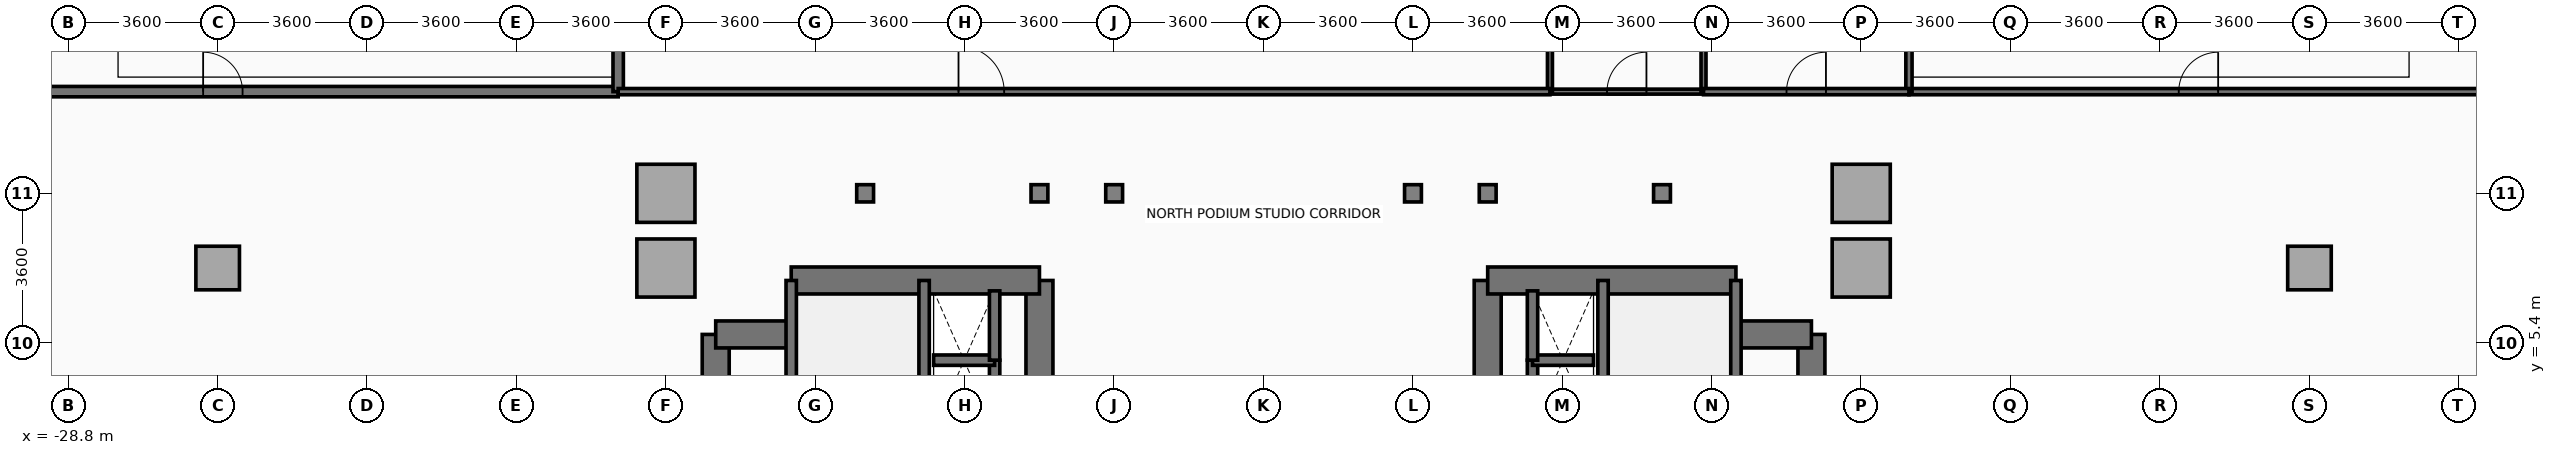
"""IFC4 building model, lengths in metres.
Left out: names, types, materials, properties, quantities, classifications, styles, units other than length and angle.
Written with IfcOpenShell. Run it as: python <this file> out.ifc"""

import sys

from ifc_helpers import new_model, si_unit, direction, frame, frame_2d, origin, origin_2d, place, context, subcontext, project, spatial, rectangle, i_section, extrude, source, transform, mapped, element, fill, save


model = new_model("IFC4")
c1 = context("Model", 3, precision=1e-05, world=origin(), true_north=direction((0.0, 1.0)))
c2 = subcontext(c1, "Body", "Model", "MODEL_VIEW")
j1 = project(units=[si_unit("LENGTHUNIT", "METRE"), si_unit("PLANEANGLEUNIT", "RADIAN")], contexts=[c1])
p1 = place(None, origin())
s1 = spatial("IfcSite", under=j1, at=p1, CompositionType="ELEMENT")
p2 = place(p1, origin())
s2 = spatial("IfcBuilding", under=s1, at=p2, CompositionType="ELEMENT")
p3 = place(p2, frame((0.0, 0.0, 10.2)))
s3 = spatial("IfcBuildingStorey", under=s2, at=p3, CompositionType="ELEMENT", Elevation=10.2)
m1 = source(origin(), c2, "Body", "SweptSolid", [
    extrude(rectangle(XDim=1.05, YDim=1.05, at=origin_2d()), origin(), (0.0, 0.0, 1.0), 5.15),
])
p4 = place(p3, frame((-25.2, 7.2, 0.0), z_axis=(0.0, 0.0, 1.0), x_axis=(1.0, 0.0, 0.0)))
e1 = element("IfcColumn", 1, at=p4, inside=s3, PredefinedType="COLUMN", context=c2, shape_type="MappedRepresentation", body=[
    mapped(m1, transform((0.0, 0.0, 0.0), x_axis=(1.0, 0.0, 0.0), y_axis=(0.0, 1.0, 0.0), z_axis=(0.0, 0.0, 1.0), scale=1.0)),
])
m2 = source(origin(), c2, "Body", "SweptSolid", [
    extrude(rectangle(XDim=1.4, YDim=1.4, at=origin_2d()), origin(), (0.0, 0.0, 1.0), 5.15),
])
for number, where, z_axis, x_axis in (
    (2, (-14.4, 7.2, 0.0), (0.0, 0.0, 1.0), (1.0, 0.0, 0.0)),
    (3, (-14.4, 9.0, 0.0), (0.0, 0.0, 1.0), (1.0, 0.0, 0.0)),
):
    element("IfcColumn", number, at=place(p3, frame(where, z_axis=z_axis, x_axis=x_axis)), inside=s3, PredefinedType="COLUMN", context=c2, shape_type="MappedRepresentation", body=[
        mapped(m2, transform((0.0, 0.0, 0.0), x_axis=(1.0, 0.0, 0.0), y_axis=(0.0, 1.0, 0.0), z_axis=(0.0, 0.0, 1.0), scale=1.0)),
    ])
m3 = source(origin(), c2, "Body", "SweptSolid", [
    extrude(i_section(OverallWidth=0.406, OverallDepth=0.416, WebThickness=0.024, FlangeThickness=0.039, at=origin_2d()), origin(), (0.0, 0.0, 1.0), 5.15),
])
for number, where, z_axis, x_axis in (
    (4, (-9.6, 9.0, 0.0), (0.0, 0.0, 1.0), (1.0, 0.0, 0.0)),
    (5, (-5.4, 9.0, 0.0), (0.0, 0.0, 1.0), (1.0, 0.0, 0.0)),
    (6, (-3.6, 9.0, 0.0), (0.0, 0.0, 1.0), (1.0, 0.0, 0.0)),
    (7, (3.6, 9.0, 0.0), (0.0, 0.0, 1.0), (1.0, 0.0, 0.0)),
    (8, (5.4, 9.0, 0.0), (0.0, 0.0, 1.0), (1.0, 0.0, 0.0)),
    (9, (9.6, 9.0, 0.0), (0.0, 0.0, 1.0), (1.0, 0.0, 0.0)),
):
    element("IfcColumn", number, at=place(p3, frame(where, z_axis=z_axis, x_axis=x_axis)), inside=s3, PredefinedType="COLUMN", context=c2, shape_type="MappedRepresentation", body=[
        mapped(m3, transform((0.0, 0.0, 0.0), x_axis=(1.0, 0.0, 0.0), y_axis=(0.0, 1.0, 0.0), z_axis=(0.0, 0.0, 1.0), scale=1.0)),
    ])
for number, where, z_axis, x_axis in (
    (10, (14.4, 7.2, 0.0), (0.0, 0.0, 1.0), (1.0, 0.0, 0.0)),
    (11, (14.4, 9.0, 0.0), (0.0, 0.0, 1.0), (1.0, 0.0, 0.0)),
):
    element("IfcColumn", number, at=place(p3, frame(where, z_axis=z_axis, x_axis=x_axis)), inside=s3, PredefinedType="COLUMN", context=c2, shape_type="MappedRepresentation", body=[
        mapped(m2, transform((0.0, 0.0, 0.0), x_axis=(1.0, 0.0, 0.0), y_axis=(0.0, 1.0, 0.0), z_axis=(0.0, 0.0, 1.0), scale=1.0)),
    ])
p5 = place(p3, frame((25.2, 7.2, 0.0), z_axis=(0.0, 0.0, 1.0), x_axis=(1.0, 0.0, 0.0)))
e12 = element("IfcColumn", 12, at=p5, inside=s3, PredefinedType="COLUMN", context=c2, shape_type="MappedRepresentation", body=[
    mapped(m1, transform((0.0, 0.0, 0.0), x_axis=(1.0, 0.0, 0.0), y_axis=(0.0, 1.0, 0.0), z_axis=(0.0, 0.0, 1.0), scale=1.0)),
])
p6 = place(p3, frame((-13.2, -5.6, 0.0), z_axis=(0.0, 0.0, 1.0), x_axis=(0.0, 1.0, 0.0)))
e13 = element("IfcWall", 13, at=p6, inside=s3, PredefinedType="SHEAR", context=c2, shape_type="SweptSolid", body=[
    extrude(rectangle(XDim=11.2, YDim=0.65, at=frame_2d((5.6, 0.0))), origin(), (0.0, 0.0, 1.0), 5.15),
])
p7 = place(p3, frame((-5.4, -5.6, 0.0), z_axis=(0.0, 0.0, 1.0), x_axis=(0.0, 1.0, 0.0)))
e14 = element("IfcWall", 14, at=p7, inside=s3, PredefinedType="SHEAR", context=c2, shape_type="SweptSolid", body=[
    extrude(rectangle(XDim=12.5, YDim=0.65, at=frame_2d((6.25, 0.0))), origin(), (0.0, 0.0, 1.0), 5.15),
])
p8 = place(p7, frame((4.55, 0.0, 0.0)))
e15 = element("IfcOpeningElement", 15, at=p8, cuts=e14, PredefinedType="OPENING", context=c2, shape_type="SweptSolid", body=[
    extrude(rectangle(XDim=1.2, YDim=2.2, at=frame_2d((0.6, 1.1))), frame((0.0, 0.335, 0.0), z_axis=(0.0, -1.0, 0.0), x_axis=(1.0, 0.0, 0.0)), (0.0, 0.0, 1.0), 0.67),
])
p9 = place(p7, frame((6.86, 0.0, 0.0)))
e16 = element("IfcOpeningElement", 16, at=p9, cuts=e14, PredefinedType="OPENING", context=c2, shape_type="SweptSolid", body=[
    extrude(rectangle(XDim=0.8, YDim=2.1, at=frame_2d((0.4, 1.05))), frame((0.0, 0.335, 0.0), z_axis=(0.0, -1.0, 0.0), x_axis=(1.0, 0.0, 0.0)), (0.0, 0.0, 1.0), 0.67),
])
p10 = place(p3, frame((-11.381, 6.9, 0.0), z_axis=(0.0, 0.0, 1.0), x_axis=(1.0, 0.0, 0.0)))
e17 = element("IfcWall", 17, at=p10, inside=s3, PredefinedType="SHEAR", context=c2, shape_type="SweptSolid", body=[
    extrude(rectangle(XDim=5.981, YDim=0.65, at=frame_2d((2.991, 0.0))), origin(), (0.0, 0.0, 1.0), 5.15),
])
p11 = place(p3, frame((-13.2, 5.6, 0.0), z_axis=(0.0, 0.0, 1.0), x_axis=(1.0, 0.0, 0.0)))
e18 = element("IfcWall", 18, at=p11, inside=s3, PredefinedType="SHEAR", context=c2, shape_type="SweptSolid", body=[
    extrude(rectangle(XDim=1.819, YDim=0.65, at=frame_2d((0.909, 0.0))), origin(), (0.0, 0.0, 1.0), 5.15),
])
p12 = place(p3, frame((-8.179, -0.041, 0.0), z_axis=(0.0, 0.0, 1.0), x_axis=(0.0, 1.0, 0.0)))
e19 = element("IfcWall", 19, at=p12, inside=s3, PredefinedType="SOLIDWALL", context=c2, shape_type="SweptSolid", body=[
    extrude(rectangle(XDim=6.941, YDim=0.25, at=frame_2d((3.47, 0.0))), origin(), (0.0, 0.0, 1.0), 5.15),
])
p13 = place(p12, frame((0.2, 0.0, 0.0)))
e20 = element("IfcOpeningElement", 20, at=p13, cuts=e19, PredefinedType="OPENING", context=c2, shape_type="SweptSolid", body=[
    extrude(rectangle(XDim=1.2, YDim=2.2, at=frame_2d((0.6, 1.1))), frame((0.0, 0.135, 0.0), z_axis=(0.0, -1.0, 0.0), x_axis=(1.0, 0.0, 0.0)), (0.0, 0.0, 1.0), 0.27),
])
p14 = place(p3, frame((-11.381, -0.041, 0.0), z_axis=(0.0, 0.0, 1.0), x_axis=(0.0, 1.0, 0.0)))
e21 = element("IfcWall", 21, at=p14, inside=s3, PredefinedType="SOLIDWALL", context=c2, shape_type="SweptSolid", body=[
    extrude(rectangle(XDim=6.941, YDim=0.25, at=frame_2d((3.47, 0.0))), origin(), (0.0, 0.0, 1.0), 5.15),
])
p15 = place(p3, frame((13.2, -5.6, 0.0), z_axis=(0.0, 0.0, 1.0), x_axis=(0.0, 1.0, 0.0)))
e22 = element("IfcWall", 22, at=p15, inside=s3, PredefinedType="SHEAR", context=c2, shape_type="SweptSolid", body=[
    extrude(rectangle(XDim=11.2, YDim=0.65, at=frame_2d((5.6, 0.0))), origin(), (0.0, 0.0, 1.0), 5.15),
])
p16 = place(p3, frame((5.4, -5.6, 0.0), z_axis=(0.0, 0.0, 1.0), x_axis=(0.0, 1.0, 0.0)))
e23 = element("IfcWall", 23, at=p16, inside=s3, PredefinedType="SHEAR", context=c2, shape_type="SweptSolid", body=[
    extrude(rectangle(XDim=12.5, YDim=0.65, at=frame_2d((6.25, 0.0))), origin(), (0.0, 0.0, 1.0), 5.15),
])
p17 = place(p16, frame((4.55, 0.0, 0.0)))
e24 = element("IfcOpeningElement", 24, at=p17, cuts=e23, PredefinedType="OPENING", context=c2, shape_type="SweptSolid", body=[
    extrude(rectangle(XDim=1.2, YDim=2.2, at=frame_2d((0.6, 1.1))), frame((0.0, 0.335, 0.0), z_axis=(0.0, -1.0, 0.0), x_axis=(1.0, 0.0, 0.0)), (0.0, 0.0, 1.0), 0.67),
])
p18 = place(p16, frame((6.86, 0.0, 0.0)))
e25 = element("IfcOpeningElement", 25, at=p18, cuts=e23, PredefinedType="OPENING", context=c2, shape_type="SweptSolid", body=[
    extrude(rectangle(XDim=0.8, YDim=2.1, at=frame_2d((0.4, 1.05))), frame((0.0, 0.335, 0.0), z_axis=(0.0, -1.0, 0.0), x_axis=(1.0, 0.0, 0.0)), (0.0, 0.0, 1.0), 0.67),
])
p19 = place(p3, frame((5.4, 6.9, 0.0), z_axis=(0.0, 0.0, 1.0), x_axis=(1.0, 0.0, 0.0)))
e26 = element("IfcWall", 26, at=p19, inside=s3, PredefinedType="SHEAR", context=c2, shape_type="SweptSolid", body=[
    extrude(rectangle(XDim=5.981, YDim=0.65, at=frame_2d((2.991, 0.0))), origin(), (0.0, 0.0, 1.0), 5.15),
])
p20 = place(p3, frame((11.381, 5.6, 0.0), z_axis=(0.0, 0.0, 1.0), x_axis=(1.0, 0.0, 0.0)))
e27 = element("IfcWall", 27, at=p20, inside=s3, PredefinedType="SHEAR", context=c2, shape_type="SweptSolid", body=[
    extrude(rectangle(XDim=1.819, YDim=0.65, at=frame_2d((0.909, 0.0))), origin(), (0.0, 0.0, 1.0), 5.15),
])
p21 = place(p3, frame((8.179, -0.041, 0.0), z_axis=(0.0, 0.0, 1.0), x_axis=(0.0, 1.0, 0.0)))
e28 = element("IfcWall", 28, at=p21, inside=s3, PredefinedType="SOLIDWALL", context=c2, shape_type="SweptSolid", body=[
    extrude(rectangle(XDim=6.941, YDim=0.25, at=frame_2d((3.47, 0.0))), origin(), (0.0, 0.0, 1.0), 5.15),
])
p22 = place(p21, frame((0.2, 0.0, 0.0)))
e29 = element("IfcOpeningElement", 29, at=p22, cuts=e28, PredefinedType="OPENING", context=c2, shape_type="SweptSolid", body=[
    extrude(rectangle(XDim=1.2, YDim=2.2, at=frame_2d((0.6, 1.1))), frame((0.0, 0.135, 0.0), z_axis=(0.0, -1.0, 0.0), x_axis=(1.0, 0.0, 0.0)), (0.0, 0.0, 1.0), 0.27),
])
p23 = place(p3, frame((11.381, -0.041, 0.0), z_axis=(0.0, 0.0, 1.0), x_axis=(0.0, 1.0, 0.0)))
e30 = element("IfcWall", 30, at=p23, inside=s3, PredefinedType="SOLIDWALL", context=c2, shape_type="SweptSolid", body=[
    extrude(rectangle(XDim=6.941, YDim=0.25, at=frame_2d((3.47, 0.0))), origin(), (0.0, 0.0, 1.0), 5.15),
])
p24 = place(p3, frame((-6.48, 3.3, 0.0), z_axis=(0.0, 0.0, 1.0), x_axis=(0.0, 1.0, 0.0)))
e31 = element("IfcWall", 31, at=p24, inside=s3, PredefinedType="SOLIDWALL", context=c2, shape_type="SweptSolid", body=[
    extrude(rectangle(XDim=1.68, YDim=0.25, at=frame_2d((0.84, 0.0))), origin(), (0.0, 0.0, 1.0), 5.15),
])
p25 = place(p3, frame((-7.95, 4.98, 0.0), z_axis=(0.0, 0.0, 1.0), x_axis=(1.0, 0.0, 0.0)))
e32 = element("IfcWall", 32, at=p25, inside=s3, PredefinedType="SOLIDWALL", context=c2, shape_type="SweptSolid", body=[
    extrude(rectangle(XDim=1.47, YDim=0.25, at=frame_2d((0.735, 0.0))), origin(), (0.0, 0.0, 1.0), 5.15),
])
p26 = place(p3, frame((-6.48, 4.98, 0.0), z_axis=(0.0, 0.0, 1.0), x_axis=(0.0, 1.0, 0.0)))
e33 = element("IfcWall", 33, at=p26, inside=s3, PredefinedType="SOLIDWALL", context=c2, shape_type="SweptSolid", body=[
    extrude(rectangle(XDim=1.67, YDim=0.25, at=frame_2d((0.835, 0.0))), origin(), (0.0, 0.0, 1.0), 5.15),
])
p27 = place(p3, frame((6.48, 3.3, 0.0), z_axis=(0.0, 0.0, 1.0), x_axis=(0.0, 1.0, 0.0)))
e34 = element("IfcWall", 34, at=p27, inside=s3, PredefinedType="SOLIDWALL", context=c2, shape_type="SweptSolid", body=[
    extrude(rectangle(XDim=1.68, YDim=0.25, at=frame_2d((0.84, 0.0))), origin(), (0.0, 0.0, 1.0), 5.15),
])
p28 = place(p3, frame((6.48, 4.98, 0.0), z_axis=(0.0, 0.0, 1.0), x_axis=(1.0, 0.0, 0.0)))
e35 = element("IfcWall", 35, at=p28, inside=s3, PredefinedType="SOLIDWALL", context=c2, shape_type="SweptSolid", body=[
    extrude(rectangle(XDim=1.47, YDim=0.25, at=frame_2d((0.735, 0.0))), origin(), (0.0, 0.0, 1.0), 5.15),
])
p29 = place(p3, frame((6.48, 4.98, 0.0), z_axis=(0.0, 0.0, 1.0), x_axis=(0.0, 1.0, 0.0)))
e36 = element("IfcWall", 36, at=p29, inside=s3, PredefinedType="SOLIDWALL", context=c2, shape_type="SweptSolid", body=[
    extrude(rectangle(XDim=1.67, YDim=0.25, at=frame_2d((0.835, 0.0))), origin(), (0.0, 0.0, 1.0), 5.15),
])
p30 = place(p3, frame((6.9, 11.45, 0.0), z_axis=(0.0, 0.0, 1.0), x_axis=(1.0, 0.0, 0.0)))
e37 = element("IfcWall", 37, at=p30, inside=s3, PredefinedType="PARTITIONING", context=c2, shape_type="SweptSolid", body=[
    extrude(rectangle(XDim=3.7, YDim=0.12, at=frame_2d((1.85, 0.0))), origin(), (0.0, 0.0, 1.0), 5.15),
])
p31 = place(p30, frame((1.375, 0.0, 0.0)))
e38 = element("IfcOpeningElement", 38, at=p31, cuts=e37, PredefinedType="OPENING", context=c2, shape_type="SweptSolid", body=[
    extrude(rectangle(XDim=0.95, YDim=2.15, at=frame_2d((0.475, 1.075))), frame((0.0, 0.07, 0.0), z_axis=(0.0, -1.0, 0.0), x_axis=(1.0, 0.0, 0.0)), (0.0, 0.0, 1.0), 0.14),
])
p32 = place(p3, frame((6.9, 11.45, 0.0), z_axis=(0.0, 0.0, 1.0), x_axis=(0.0, 1.0, 0.0)))
e39 = element("IfcWall", 39, at=p32, inside=s3, PredefinedType="PARTITIONING", context=c2, shape_type="SweptSolid", body=[
    extrude(rectangle(XDim=3.73, YDim=0.12, at=frame_2d((1.865, 0.0))), origin(), (0.0, 0.0, 1.0), 4.45),
])
p33 = place(p3, frame((10.6, 11.45, 0.0), z_axis=(0.0, 0.0, 1.0), x_axis=(0.0, 1.0, 0.0)))
e40 = element("IfcWall", 40, at=p33, inside=s3, PredefinedType="PARTITIONING", context=c2, shape_type="SweptSolid", body=[
    extrude(rectangle(XDim=3.73, YDim=0.12, at=frame_2d((1.865, 0.0))), origin(), (0.0, 0.0, 1.0), 5.15),
])
p34 = place(p3, frame((-32.05, 11.45, 0.0), z_axis=(0.0, 0.0, 1.0), x_axis=(1.0, 0.0, 0.0)))
e41 = element("IfcWall", 41, at=p34, inside=s3, PredefinedType="SOLIDWALL", context=c2, shape_type="SweptSolid", body=[
    extrude(rectangle(XDim=16.5, YDim=0.25, at=frame_2d((8.25, 0.0))), origin(), (0.0, 0.0, 1.0), 5.15),
])
p35 = place(p34, frame((6.5, 0.0, 0.0)))
e42 = element("IfcOpeningElement", 42, at=p35, cuts=e41, PredefinedType="OPENING", context=c2, shape_type="SweptSolid", body=[
    extrude(rectangle(XDim=0.95, YDim=2.15, at=frame_2d((0.475, 1.075))), frame((0.0, 0.135, 0.0), z_axis=(0.0, -1.0, 0.0), x_axis=(1.0, 0.0, 0.0)), (0.0, 0.0, 1.0), 0.27),
])
p36 = place(p3, frame((-15.55, 11.45, 0.0), z_axis=(0.0, 0.0, 1.0), x_axis=(0.0, 1.0, 0.0)))
e43 = element("IfcWall", 43, at=p36, inside=s3, PredefinedType="SOLIDWALL", context=c2, shape_type="SweptSolid", body=[
    extrude(rectangle(XDim=11.6, YDim=0.25, at=frame_2d((5.8, 0.0))), origin(), (0.0, 0.0, 1.0), 5.15),
])
p37 = place(p3, frame((15.55, 11.45, 0.0), z_axis=(0.0, 0.0, 1.0), x_axis=(1.0, 0.0, 0.0)))
e44 = element("IfcWall", 44, at=p37, inside=s3, PredefinedType="PARTITIONING", context=c2, shape_type="SweptSolid", body=[
    extrude(rectangle(XDim=16.5, YDim=0.15, at=frame_2d((8.25, 0.0))), origin(), (0.0, 0.0, 1.0), 5.15),
])
p38 = place(p37, frame((6.5, 0.0, 0.0)))
e45 = element("IfcOpeningElement", 45, at=p38, cuts=e44, PredefinedType="OPENING", context=c2, shape_type="SweptSolid", body=[
    extrude(rectangle(XDim=0.95, YDim=2.15, at=frame_2d((0.475, 1.075))), frame((0.0, 0.085, 0.0), z_axis=(0.0, -1.0, 0.0), x_axis=(1.0, 0.0, 0.0)), (0.0, 0.0, 1.0), 0.17),
])
p39 = place(p3, frame((15.55, 11.45, 0.0), z_axis=(0.0, 0.0, 1.0), x_axis=(0.0, 1.0, 0.0)))
e46 = element("IfcWall", 46, at=p39, inside=s3, PredefinedType="PARTITIONING", context=c2, shape_type="SweptSolid", body=[
    extrude(rectangle(XDim=11.6, YDim=0.15, at=frame_2d((5.8, 0.0))), origin(), (0.0, 0.0, 1.0), 5.15),
])
p40 = place(p3, frame((-15.55, 11.45, 0.0), z_axis=(0.0, 0.0, 1.0), x_axis=(1.0, 0.0, 0.0)))
e47 = element("IfcWall", 47, at=p40, inside=s3, PredefinedType="PARTITIONING", context=c2, shape_type="SweptSolid", body=[
    extrude(rectangle(XDim=22.45, YDim=0.15, at=frame_2d((11.225, 0.0))), origin(), (0.0, 0.0, 1.0), 4.55),
])
p41 = place(p40, frame((8.2, 0.0, 0.0)))
e48 = element("IfcOpeningElement", 48, at=p41, cuts=e47, PredefinedType="OPENING", context=c2, shape_type="SweptSolid", body=[
    extrude(rectangle(XDim=1.1, YDim=2.2, at=frame_2d((0.55, 1.1))), frame((0.0, 0.085, 0.0), z_axis=(0.0, -1.0, 0.0), x_axis=(1.0, 0.0, 0.0)), (0.0, 0.0, 1.0), 0.17),
])
p42 = place(p3, frame((10.6, 11.45, 0.0), z_axis=(0.0, 0.0, 1.0), x_axis=(1.0, 0.0, 0.0)))
e49 = element("IfcWall", 49, at=p42, inside=s3, PredefinedType="PARTITIONING", context=c2, shape_type="SweptSolid", body=[
    extrude(rectangle(XDim=4.95, YDim=0.15, at=frame_2d((2.475, 0.0))), origin(), (0.0, 0.0, 1.0), 4.55),
])
p43 = place(p42, frame((2.0, 0.0, 0.0)))
e50 = element("IfcOpeningElement", 50, at=p43, cuts=e49, PredefinedType="OPENING", context=c2, shape_type="SweptSolid", body=[
    extrude(rectangle(XDim=0.95, YDim=2.15, at=frame_2d((0.475, 1.075))), frame((0.0, 0.085, 0.0), z_axis=(0.0, -1.0, 0.0), x_axis=(1.0, 0.0, 0.0)), (0.0, 0.0, 1.0), 0.17),
])
m4 = source(origin(), c2, "Body", "SweptSolid", [
    extrude(rectangle(XDim=0.95, YDim=2.15, at=frame_2d((0.475, 1.075))), frame((0.0, 0.025, 0.0), z_axis=(0.0, -1.0, 0.0), x_axis=(1.0, 0.0, 0.0)), (0.0, 0.0, 1.0), 0.05),
])
p44 = place(p31, origin())
e51 = element("IfcDoor", 51, at=p44, inside=s3, OperationType="SINGLE_SWING_RIGHT", PredefinedType="DOOR", context=c2, shape_type="MappedRepresentation", body=[
    mapped(m4, transform((0.0, 0.0, 0.0), x_axis=(1.0, 0.0, 0.0), y_axis=(0.0, 1.0, 0.0), z_axis=(0.0, 0.0, 1.0), scale=1.0)),
])
fill(e38, e51)
p45 = place(p35, origin())
e52 = element("IfcDoor", 52, at=p45, inside=s3, OperationType="SINGLE_SWING_LEFT", PredefinedType="DOOR", context=c2, shape_type="MappedRepresentation", body=[
    mapped(m4, transform((0.0, 0.0, 0.0), x_axis=(1.0, 0.0, 0.0), y_axis=(0.0, 1.0, 0.0), z_axis=(0.0, 0.0, 1.0), scale=1.0)),
])
fill(e42, e52)
p46 = place(p38, origin())
e53 = element("IfcDoor", 53, at=p46, inside=s3, OperationType="SINGLE_SWING_RIGHT", PredefinedType="DOOR", context=c2, shape_type="MappedRepresentation", body=[
    mapped(m4, transform((0.0, 0.0, 0.0), x_axis=(1.0, 0.0, 0.0), y_axis=(0.0, 1.0, 0.0), z_axis=(0.0, 0.0, 1.0), scale=1.0)),
])
fill(e45, e53)
m5 = source(origin(), c2, "Body", "SweptSolid", [
    extrude(rectangle(XDim=1.1, YDim=2.2, at=frame_2d((0.55, 1.1))), frame((0.0, 0.025, 0.0), z_axis=(0.0, -1.0, 0.0), x_axis=(1.0, 0.0, 0.0)), (0.0, 0.0, 1.0), 0.05),
])
p47 = place(p41, origin())
e54 = element("IfcDoor", 54, at=p47, inside=s3, OperationType="SINGLE_SWING_LEFT", PredefinedType="DOOR", context=c2, shape_type="MappedRepresentation", body=[
    mapped(m5, transform((0.0, 0.0, 0.0), x_axis=(1.0, 0.0, 0.0), y_axis=(0.0, 1.0, 0.0), z_axis=(0.0, 0.0, 1.0), scale=1.0)),
])
fill(e48, e54)
p48 = place(p43, origin())
e55 = element("IfcDoor", 55, at=p48, inside=s3, OperationType="SINGLE_SWING_RIGHT", PredefinedType="DOOR", context=c2, shape_type="MappedRepresentation", body=[
    mapped(m4, transform((0.0, 0.0, 0.0), x_axis=(1.0, 0.0, 0.0), y_axis=(0.0, 1.0, 0.0), z_axis=(0.0, 0.0, 1.0), scale=1.0)),
])
fill(e50, e55)
save(model, sys.argv[1])
